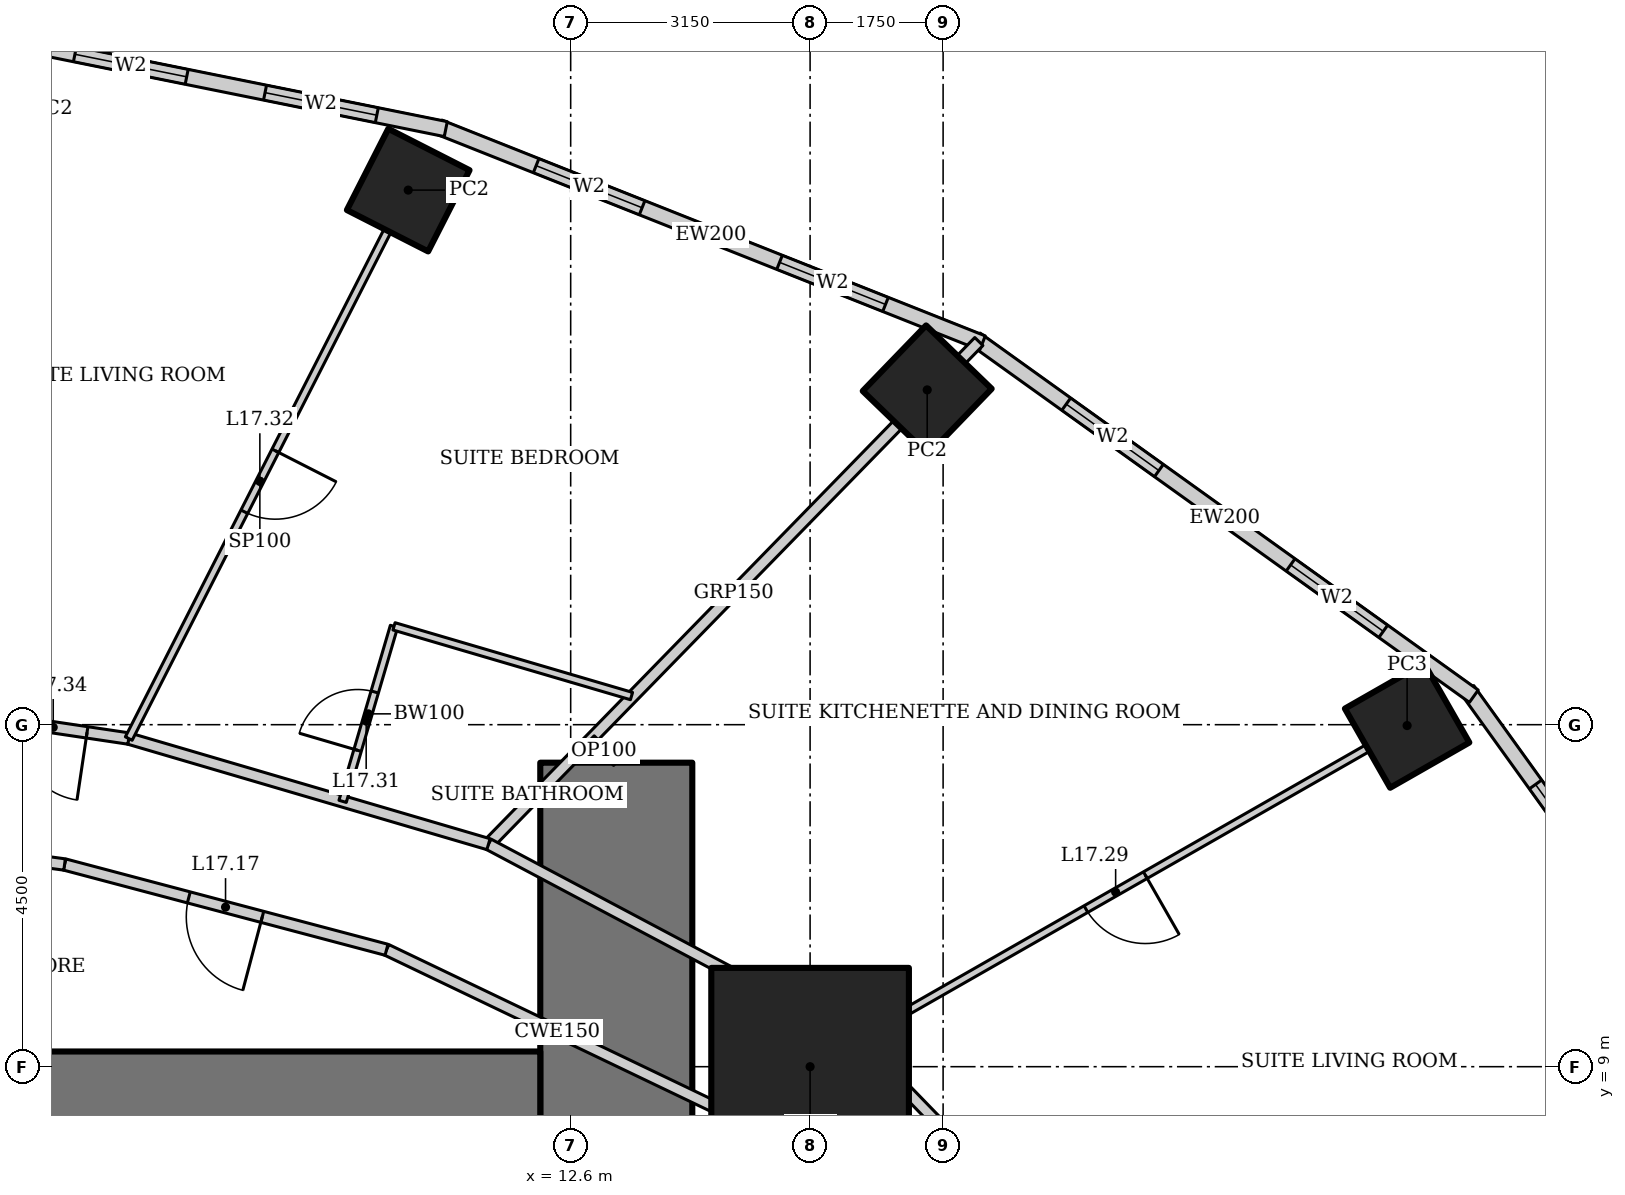
"""IFC4 building model, lengths in metres.
Left out: names, types, materials, properties, quantities, classifications, styles, units other than length and angle.
Written with IfcOpenShell. Run it as: python <this file> out.ifc"""

import sys

from ifc_helpers import new_model, si_unit, direction, frame, frame_2d, origin, origin_2d, place, context, subcontext, project, spatial, rectangle, hollow_rectangle, extrude, element, fill, save


model = new_model("IFC4")
c1 = context("Model", 3, precision=1e-05, world=origin(), true_north=direction((0.0, 1.0)))
c2 = subcontext(c1, "Body", "Model", "MODEL_VIEW")
j1 = project(units=[si_unit("LENGTHUNIT", "METRE"), si_unit("PLANEANGLEUNIT", "RADIAN")], contexts=[c1])
p1 = place(None, origin())
s1 = spatial("IfcSite", under=j1, at=p1, CompositionType="ELEMENT")
p2 = place(p1, origin())
s2 = spatial("IfcBuilding", under=s1, at=p2, CompositionType="ELEMENT")
p3 = place(p2, frame((0.0, 0.0, 76.6)))
s3 = spatial("IfcBuildingStorey", under=s2, at=p3, CompositionType="ELEMENT", Elevation=76.6)
p4 = place(p3, frame((15.75, 9.0, 0.0), z_axis=(0.0, 0.0, 1.0), x_axis=(1.0, 0.0, 0.0)))
e1 = element("IfcColumn", 1, at=p4, inside=s3, PredefinedType="COLUMN", context=c2, shape_type="SweptSolid", body=[
    extrude(hollow_rectangle(XDim=2.6, YDim=2.6, WallThickness=0.13, at=origin_2d()), origin(), (0.0, 0.0, 1.0), 3.6),
])
p5 = place(p3, frame((23.605, 13.489, 0.0), z_axis=(0.0, 0.0, 1.0), x_axis=(0.86824298017, 0.496139221777, 0.0)))
e2 = element("IfcColumn", 2, at=p5, inside=s3, PredefinedType="COLUMN", context=c2, shape_type="SweptSolid", body=[
    extrude(hollow_rectangle(XDim=1.2, YDim=1.2, WallThickness=0.12, at=origin_2d()), origin(), (0.0, 0.0, 1.0), 3.6),
])
for number, where, z_axis, x_axis in (
    (3, (17.291, 17.905, 0.0), (0.0, 0.0, 1.0), (0.695, 0.719, 0.0)),
    (4, (10.463, 20.534, 0.0), (0.0, 0.0, 1.0), (0.454, 0.891, 0.0)),
):
    element("IfcColumn", number, at=place(p3, frame(where, z_axis=z_axis, x_axis=x_axis)), inside=s3, PredefinedType="COLUMN", context=c2, shape_type="SweptSolid", body=[
        extrude(hollow_rectangle(XDim=1.2, YDim=1.2, WallThickness=0.1, at=origin_2d()), origin(), (0.0, 0.0, 1.0), 3.6),
    ])
p6 = place(p3, frame((13.2, -13.0, 0.0), z_axis=(0.0, 0.0, 1.0), x_axis=(0.0, 1.0, 0.0)))
e5 = element("IfcWall", 5, at=p6, inside=s3, PredefinedType="SHEAR", context=c2, shape_type="SweptSolid", body=[
    extrude(rectangle(XDim=26.0, YDim=2.0, at=frame_2d((13.0, 0.0))), origin(), (0.0, 0.0, 1.0), 3.6),
])
p7 = place(p6, frame((12.1, 0.0, 0.0)))
e6 = element("IfcOpeningElement", 6, at=p7, cuts=e5, PredefinedType="OPENING", context=c2, shape_type="SweptSolid", body=[
    extrude(rectangle(XDim=1.8, YDim=2.1, at=frame_2d((0.9, 1.05))), frame((0.0, 1.01, 0.0), z_axis=(0.0, -1.0, 0.0), x_axis=(1.0, 0.0, 0.0)), (0.0, 0.0, 1.0), 2.02),
])
p8 = place(p3, frame((12.2, 8.0, 0.0), z_axis=(0.0, 0.0, 1.0), x_axis=(-1.0, 0.0, 0.0)))
e7 = element("IfcWall", 7, at=p8, inside=s3, PredefinedType="SHEAR", context=c2, shape_type="SweptSolid", body=[
    extrude(rectangle(XDim=24.4, YDim=2.4, at=frame_2d((12.2, 0.0))), origin(), (0.0, 0.0, 1.0), 3.6),
])
p9 = place(p3, frame((29.26, 7.2, 0.0), z_axis=(0.0, 0.0, 1.0), x_axis=(-0.583937613703, 0.811798536155, 0.0)))
e8 = element("IfcWall", 8, at=p9, inside=s3, PredefinedType="SOLIDWALL", context=c2, shape_type="SweptSolid", body=[
    extrude(rectangle(XDim=8.323, YDim=0.2, at=frame_2d((4.162, 0.0))), origin(), (0.0, 0.0, 1.0), 3.45),
])
p10 = place(p9, frame((1.531, 0.0, 0.5)))
e9 = element("IfcOpeningElement", 9, at=p10, cuts=e8, PredefinedType="OPENING", context=c2, shape_type="SweptSolid", body=[
    extrude(rectangle(XDim=1.5, YDim=2.2, at=frame_2d((0.75, 1.1))), frame((0.0, 0.11, 0.0), z_axis=(0.0, -1.0, 0.0), x_axis=(1.0, 0.0, 0.0)), (0.0, 0.0, 1.0), 0.22),
])
p11 = place(p9, frame((5.292, 0.0, 0.5)))
e10 = element("IfcOpeningElement", 10, at=p11, cuts=e8, PredefinedType="OPENING", context=c2, shape_type="SweptSolid", body=[
    extrude(rectangle(XDim=1.5, YDim=2.2, at=frame_2d((0.75, 1.1))), frame((0.0, 0.11, 0.0), z_axis=(0.0, -1.0, 0.0), x_axis=(1.0, 0.0, 0.0)), (0.0, 0.0, 1.0), 0.22),
])
p12 = place(p3, frame((24.482, 13.875, 0.0), z_axis=(0.0, 0.0, 1.0), x_axis=(-0.812791321576, 0.582554948112, 0.0)))
e11 = element("IfcWall", 11, at=p12, inside=s3, PredefinedType="SOLIDWALL", context=c2, shape_type="SweptSolid", body=[
    extrude(rectangle(XDim=8.063, YDim=0.2, at=frame_2d((4.032, 0.0))), origin(), (0.0, 0.0, 1.0), 3.45),
])
p13 = place(p12, frame((1.466, 0.0, 0.5)))
e12 = element("IfcOpeningElement", 12, at=p13, cuts=e11, PredefinedType="OPENING", context=c2, shape_type="SweptSolid", body=[
    extrude(rectangle(XDim=1.5, YDim=2.2, at=frame_2d((0.75, 1.1))), frame((0.0, 0.11, 0.0), z_axis=(0.0, -1.0, 0.0), x_axis=(1.0, 0.0, 0.0)), (0.0, 0.0, 1.0), 0.22),
])
p14 = place(p12, frame((5.097, 0.0, 0.5)))
e13 = element("IfcOpeningElement", 13, at=p14, cuts=e11, PredefinedType="OPENING", context=c2, shape_type="SweptSolid", body=[
    extrude(rectangle(XDim=1.5, YDim=2.2, at=frame_2d((0.75, 1.1))), frame((0.0, 0.11, 0.0), z_axis=(0.0, -1.0, 0.0), x_axis=(1.0, 0.0, 0.0)), (0.0, 0.0, 1.0), 0.22),
])
p15 = place(p3, frame((18.018, 18.523, 0.0), z_axis=(0.0, 0.0, 1.0), x_axis=(-0.929358351251, 0.369178892895, 0.0)))
e14 = element("IfcWall", 14, at=p15, inside=s3, PredefinedType="SOLIDWALL", context=c2, shape_type="SweptSolid", body=[
    extrude(rectangle(XDim=7.692, YDim=0.2, at=frame_2d((3.846, 0.0))), origin(), (0.0, 0.0, 1.0), 3.45),
])
p16 = place(p15, frame((1.373, 0.0, 0.5)))
e15 = element("IfcOpeningElement", 15, at=p16, cuts=e14, PredefinedType="OPENING", context=c2, shape_type="SweptSolid", body=[
    extrude(rectangle(XDim=1.5, YDim=2.2, at=frame_2d((0.75, 1.1))), frame((0.0, 0.11, 0.0), z_axis=(0.0, -1.0, 0.0), x_axis=(1.0, 0.0, 0.0)), (0.0, 0.0, 1.0), 0.22),
])
p17 = place(p15, frame((4.819, 0.0, 0.5)))
e16 = element("IfcOpeningElement", 16, at=p17, cuts=e14, PredefinedType="OPENING", context=c2, shape_type="SweptSolid", body=[
    extrude(rectangle(XDim=1.5, YDim=2.2, at=frame_2d((0.75, 1.1))), frame((0.0, 0.11, 0.0), z_axis=(0.0, -1.0, 0.0), x_axis=(1.0, 0.0, 0.0)), (0.0, 0.0, 1.0), 0.22),
])
p18 = place(p3, frame((10.957, 21.337, 0.0), z_axis=(0.0, 0.0, 1.0), x_axis=(-0.980251657452, 0.197754110105, 0.0)))
e17 = element("IfcWall", 17, at=p18, inside=s3, PredefinedType="SOLIDWALL", context=c2, shape_type="SweptSolid", body=[
    extrude(rectangle(XDim=5.904, YDim=0.2, at=frame_2d((2.952, 0.0))), origin(), (0.0, 0.0, 1.0), 3.45),
])
p19 = place(p18, frame((0.926, 0.0, 0.5)))
e18 = element("IfcOpeningElement", 18, at=p19, cuts=e17, PredefinedType="OPENING", context=c2, shape_type="SweptSolid", body=[
    extrude(rectangle(XDim=1.5, YDim=2.2, at=frame_2d((0.75, 1.1))), frame((0.0, 0.11, 0.0), z_axis=(0.0, -1.0, 0.0), x_axis=(1.0, 0.0, 0.0)), (0.0, 0.0, 1.0), 0.22),
])
p20 = place(p18, frame((3.478, 0.0, 0.5)))
e19 = element("IfcOpeningElement", 19, at=p20, cuts=e17, PredefinedType="OPENING", context=c2, shape_type="SweptSolid", body=[
    extrude(rectangle(XDim=1.5, YDim=2.2, at=frame_2d((0.75, 1.1))), frame((0.0, 0.11, 0.0), z_axis=(0.0, -1.0, 0.0), x_axis=(1.0, 0.0, 0.0)), (0.0, 0.0, 1.0), 0.22),
])
p21 = place(p3, frame((17.97, 18.542, 0.0), z_axis=(0.0, 0.0, 1.0), x_axis=(-0.698279935955, -0.715824790743, 0.0)))
e20 = element("IfcWall", 20, at=p21, inside=s3, PredefinedType="PARTITIONING", context=c2, shape_type="SweptSolid", body=[
    extrude(rectangle(XDim=9.24, YDim=0.15, at=frame_2d((4.62, 0.0))), origin(), (0.0, 0.0, 1.0), 2.528),
])
p22 = place(p3, frame((20.484, 5.107, 0.0), z_axis=(0.0, 0.0, 1.0), x_axis=(-0.695871090686, 0.71816671125, 0.0)))
e21 = element("IfcWall", 21, at=p22, inside=s3, PredefinedType="PARTITIONING", context=c2, shape_type="SweptSolid", body=[
    extrude(rectangle(XDim=5.913, YDim=0.15, at=frame_2d((2.957, 0.0))), origin(), (0.0, 0.0, 1.0), 3.45),
])
p23 = place(p22, frame((0.15, 0.0, 0.0)))
e22 = element("IfcOpeningElement", 22, at=p23, cuts=e21, PredefinedType="OPENING", context=c2, shape_type="SweptSolid", body=[
    extrude(rectangle(XDim=0.9, YDim=2.1, at=frame_2d((0.45, 1.05))), frame((0.0, 0.085, 0.0), z_axis=(0.0, -1.0, 0.0), x_axis=(1.0, 0.0, 0.0)), (0.0, 0.0, 1.0), 0.17),
])
p24 = place(p3, frame((16.369, 9.354, 0.0), z_axis=(0.0, 0.0, 1.0), x_axis=(-0.883334368785, 0.468743419071, 0.0)))
e23 = element("IfcWall", 23, at=p24, inside=s3, PredefinedType="PARTITIONING", context=c2, shape_type="SweptSolid", body=[
    extrude(rectangle(XDim=5.491, YDim=0.15, at=frame_2d((2.746, 0.0))), origin(), (0.0, 0.0, 1.0), 3.45),
])
p25 = place(p3, frame((11.519, 11.928, 0.0), z_axis=(0.0, 0.0, 1.0), x_axis=(-0.959496227294, 0.281721475589, 0.0)))
e24 = element("IfcWall", 24, at=p25, inside=s3, PredefinedType="PARTITIONING", context=c2, shape_type="SweptSolid", body=[
    extrude(rectangle(XDim=4.933, YDim=0.15, at=frame_2d((2.466, 0.0))), origin(), (0.0, 0.0, 1.0), 3.45),
])
p26 = place(p3, frame((6.786, 13.317, 0.0), z_axis=(0.0, 0.0, 1.0), x_axis=(-0.989107488999, 0.14719502439, 0.0)))
e25 = element("IfcWall", 25, at=p26, inside=s3, PredefinedType="PARTITIONING", context=c2, shape_type="SweptSolid", body=[
    extrude(rectangle(XDim=3.627, YDim=0.15, at=frame_2d((1.814, 0.0))), origin(), (0.0, 0.0, 1.0), 3.45),
])
p27 = place(p26, frame((0.554, 0.0, 0.0)))
e26 = element("IfcOpeningElement", 26, at=p27, cuts=e25, PredefinedType="OPENING", context=c2, shape_type="SweptSolid", body=[
    extrude(rectangle(XDim=0.9, YDim=2.1, at=frame_2d((0.45, 1.05))), frame((0.0, 0.085, 0.0), z_axis=(0.0, -1.0, 0.0), x_axis=(1.0, 0.0, 0.0)), (0.0, 0.0, 1.0), 0.17),
])
p28 = place(p3, frame((18.672, 4.655, 0.0), z_axis=(0.0, 0.0, 1.0), x_axis=(-0.731260145007, 0.682098673452, 0.0)))
e27 = element("IfcWall", 27, at=p28, inside=s3, PredefinedType="PARTITIONING", context=c2, shape_type="SweptSolid", body=[
    extrude(rectangle(XDim=5.468, YDim=0.15, at=frame_2d((2.734, 0.0))), origin(), (0.0, 0.0, 1.0), 3.45),
])
p29 = place(p28, frame((2.234, 0.0, 0.0)))
e28 = element("IfcOpeningElement", 28, at=p29, cuts=e27, PredefinedType="OPENING", context=c2, shape_type="SweptSolid", body=[
    extrude(rectangle(XDim=1.0, YDim=2.1, at=frame_2d((0.5, 1.05))), frame((0.0, 0.085, 0.0), z_axis=(0.0, -1.0, 0.0), x_axis=(1.0, 0.0, 0.0)), (0.0, 0.0, 1.0), 0.17),
])
p30 = place(p3, frame((14.673, 8.385, 0.0), z_axis=(0.0, 0.0, 1.0), x_axis=(-0.901869692799, 0.43200816799, 0.0)))
e29 = element("IfcWall", 29, at=p30, inside=s3, PredefinedType="PARTITIONING", context=c2, shape_type="SweptSolid", body=[
    extrude(rectangle(XDim=4.986, YDim=0.15, at=frame_2d((2.493, 0.0))), origin(), (0.0, 0.0, 1.0), 3.45),
])
p31 = place(p3, frame((10.177, 10.539, 0.0), z_axis=(0.0, 0.0, 1.0), x_axis=(-0.966672790407, 0.256015070428, 0.0)))
e30 = element("IfcWall", 30, at=p31, inside=s3, PredefinedType="PARTITIONING", context=c2, shape_type="SweptSolid", body=[
    extrude(rectangle(XDim=4.382, YDim=0.15, at=frame_2d((2.191, 0.0))), origin(), (0.0, 0.0, 1.0), 3.45),
])
p32 = place(p31, frame((1.691, 0.0, 0.0)))
e31 = element("IfcOpeningElement", 31, at=p32, cuts=e30, PredefinedType="OPENING", context=c2, shape_type="SweptSolid", body=[
    extrude(rectangle(XDim=1.0, YDim=2.1, at=frame_2d((0.5, 1.05))), frame((0.0, 0.085, 0.0), z_axis=(0.0, -1.0, 0.0), x_axis=(1.0, 0.0, 0.0)), (0.0, 0.0, 1.0), 0.17),
])
p33 = place(p3, frame((5.941, 11.66, 0.0), z_axis=(0.0, 0.0, 1.0), x_axis=(-0.991129053928, 0.13290296633, 0.0)))
e32 = element("IfcWall", 32, at=p33, inside=s3, PredefinedType="PARTITIONING", context=c2, shape_type="SweptSolid", body=[
    extrude(rectangle(XDim=3.18, YDim=0.15, at=frame_2d((1.59, 0.0))), origin(), (0.0, 0.0, 1.0), 3.45),
])
p34 = place(p3, frame((23.171, 13.24, 0.0), z_axis=(0.0, 0.0, 1.0), x_axis=(-0.868243142124, -0.496138938357, 0.0)))
e33 = element("IfcWall", 33, at=p34, inside=s3, PredefinedType="PARTITIONING", context=c2, shape_type="SweptSolid", body=[
    extrude(rectangle(XDim=7.834, YDim=0.1, at=frame_2d((3.917, 0.0))), origin(), (0.0, 0.0, 1.0), 2.693),
])
p35 = place(p34, frame((3.467, 0.0, 0.0)))
e34 = element("IfcOpeningElement", 34, at=p35, cuts=e33, PredefinedType="OPENING", context=c2, shape_type="SweptSolid", body=[
    extrude(rectangle(XDim=0.9, YDim=2.1, at=frame_2d((0.45, 1.05))), frame((0.0, 0.06, 0.0), z_axis=(0.0, -1.0, 0.0), x_axis=(1.0, 0.0, 0.0)), (0.0, 0.0, 1.0), 0.12),
])
p36 = place(p3, frame((9.6, 12.491, 0.0), z_axis=(0.0, 0.0, 1.0), x_axis=(0.281687126576, 0.959506311976, 0.0)))
e35 = element("IfcWall", 35, at=p36, inside=s3, PredefinedType="PARTITIONING", context=c2, shape_type="SweptSolid", body=[
    extrude(rectangle(XDim=2.4, YDim=0.1, at=frame_2d((1.2, 0.0))), origin(), (0.0, 0.0, 1.0), 3.45),
])
p37 = place(p36, frame((0.7, 0.0, 0.0)))
e36 = element("IfcOpeningElement", 36, at=p37, cuts=e35, PredefinedType="OPENING", context=c2, shape_type="SweptSolid", body=[
    extrude(rectangle(XDim=0.8, YDim=2.1, at=frame_2d((0.4, 1.05))), frame((0.0, 0.06, 0.0), z_axis=(0.0, -1.0, 0.0), x_axis=(1.0, 0.0, 0.0)), (0.0, 0.0, 1.0), 0.12),
])
p38 = place(p3, frame((10.276, 14.794, 0.0), z_axis=(0.0, 0.0, 1.0), x_axis=(0.959495516486, -0.281723896473, 0.0)))
e37 = element("IfcWall", 37, at=p38, inside=s3, PredefinedType="PARTITIONING", context=c2, shape_type="SweptSolid", body=[
    extrude(rectangle(XDim=3.257, YDim=0.1, at=frame_2d((1.628, 0.0))), origin(), (0.0, 0.0, 1.0), 3.45),
])
p39 = place(p3, frame((10.236, 20.088, 0.0), z_axis=(0.0, 0.0, 1.0), x_axis=(-0.453985938962, -0.891008848006, 0.0)))
e38 = element("IfcWall", 38, at=p39, inside=s3, PredefinedType="PARTITIONING", context=c2, shape_type="SweptSolid", body=[
    extrude(rectangle(XDim=7.599, YDim=0.1, at=frame_2d((3.8, 0.0))), origin(), (0.0, 0.0, 1.0), 2.528),
])
p40 = place(p39, frame((3.35, 0.0, 0.0)))
e39 = element("IfcOpeningElement", 39, at=p40, cuts=e38, PredefinedType="OPENING", context=c2, shape_type="SweptSolid", body=[
    extrude(rectangle(XDim=0.9, YDim=2.1, at=frame_2d((0.45, 1.05))), frame((0.0, 0.06, 0.0), z_axis=(0.0, -1.0, 0.0), x_axis=(1.0, 0.0, 0.0)), (0.0, 0.0, 1.0), 0.12),
])
p41 = place(p3, frame((13.2, 13.0, 0.0), z_axis=(0.0, 0.0, 1.0), x_axis=(-0.715906247499, 0.698196422786, 0.0)))
e40 = element("IfcWall", 40, at=p41, inside=s3, PredefinedType="PARTITIONING", context=c2, shape_type="SweptSolid", body=[
    extrude(rectangle(XDim=0.455, YDim=0.1, at=frame_2d((0.228, 0.0))), origin(), (0.0, 0.0, 1.0), 3.45),
])
p42 = place(p11, origin())
e41 = element("IfcWindow", 41, at=p42, inside=s3, PartitioningType="SINGLE_PANEL", PredefinedType="WINDOW", context=c2, shape_type="SweptSolid", body=[
    extrude(rectangle(XDim=1.5, YDim=2.2, at=frame_2d((0.75, 1.1))), frame((0.0, 0.03, 0.0), z_axis=(0.0, -1.0, 0.0), x_axis=(1.0, 0.0, 0.0)), (0.0, 0.0, 1.0), 0.06),
])
fill(e10, e41)
p43 = place(p13, origin())
e42 = element("IfcWindow", 42, at=p43, inside=s3, PartitioningType="SINGLE_PANEL", PredefinedType="WINDOW", context=c2, shape_type="SweptSolid", body=[
    extrude(rectangle(XDim=1.5, YDim=2.2, at=frame_2d((0.75, 1.1))), frame((0.0, 0.03, 0.0), z_axis=(0.0, -1.0, 0.0), x_axis=(1.0, 0.0, 0.0)), (0.0, 0.0, 1.0), 0.06),
])
fill(e12, e42)
p44 = place(p14, origin())
e43 = element("IfcWindow", 43, at=p44, inside=s3, PartitioningType="SINGLE_PANEL", PredefinedType="WINDOW", context=c2, shape_type="SweptSolid", body=[
    extrude(rectangle(XDim=1.5, YDim=2.2, at=frame_2d((0.75, 1.1))), frame((0.0, 0.03, 0.0), z_axis=(0.0, -1.0, 0.0), x_axis=(1.0, 0.0, 0.0)), (0.0, 0.0, 1.0), 0.06),
])
fill(e13, e43)
p45 = place(p16, origin())
e44 = element("IfcWindow", 44, at=p45, inside=s3, PartitioningType="SINGLE_PANEL", PredefinedType="WINDOW", context=c2, shape_type="SweptSolid", body=[
    extrude(rectangle(XDim=1.5, YDim=2.2, at=frame_2d((0.75, 1.1))), frame((0.0, 0.03, 0.0), z_axis=(0.0, -1.0, 0.0), x_axis=(1.0, 0.0, 0.0)), (0.0, 0.0, 1.0), 0.06),
])
fill(e15, e44)
p46 = place(p17, origin())
e45 = element("IfcWindow", 45, at=p46, inside=s3, PartitioningType="SINGLE_PANEL", PredefinedType="WINDOW", context=c2, shape_type="SweptSolid", body=[
    extrude(rectangle(XDim=1.5, YDim=2.2, at=frame_2d((0.75, 1.1))), frame((0.0, 0.03, 0.0), z_axis=(0.0, -1.0, 0.0), x_axis=(1.0, 0.0, 0.0)), (0.0, 0.0, 1.0), 0.06),
])
fill(e16, e45)
p47 = place(p19, origin())
e46 = element("IfcWindow", 46, at=p47, inside=s3, PartitioningType="SINGLE_PANEL", PredefinedType="WINDOW", context=c2, shape_type="SweptSolid", body=[
    extrude(rectangle(XDim=1.5, YDim=2.2, at=frame_2d((0.75, 1.1))), frame((0.0, 0.03, 0.0), z_axis=(0.0, -1.0, 0.0), x_axis=(1.0, 0.0, 0.0)), (0.0, 0.0, 1.0), 0.06),
])
fill(e18, e46)
p48 = place(p20, origin())
e47 = element("IfcWindow", 47, at=p48, inside=s3, PartitioningType="SINGLE_PANEL", PredefinedType="WINDOW", context=c2, shape_type="SweptSolid", body=[
    extrude(rectangle(XDim=1.5, YDim=2.2, at=frame_2d((0.75, 1.1))), frame((0.0, 0.03, 0.0), z_axis=(0.0, -1.0, 0.0), x_axis=(1.0, 0.0, 0.0)), (0.0, 0.0, 1.0), 0.06),
])
fill(e19, e47)
p49 = place(p32, origin())
e48 = element("IfcDoor", 48, at=p49, inside=s3, OperationType="SINGLE_SWING_LEFT", PredefinedType="DOOR", context=c2, shape_type="SweptSolid", body=[
    extrude(rectangle(XDim=1.0, YDim=2.1, at=frame_2d((0.5, 1.05))), frame((0.0, 0.025, 0.0), z_axis=(0.0, -1.0, 0.0), x_axis=(1.0, 0.0, 0.0)), (0.0, 0.0, 1.0), 0.05),
])
fill(e31, e48)
p50 = place(p35, origin())
e49 = element("IfcDoor", 49, at=p50, inside=s3, OperationType="SINGLE_SWING_LEFT", PredefinedType="DOOR", context=c2, shape_type="SweptSolid", body=[
    extrude(rectangle(XDim=0.9, YDim=2.1, at=frame_2d((0.45, 1.05))), frame((0.0, 0.025, 0.0), z_axis=(0.0, -1.0, 0.0), x_axis=(1.0, 0.0, 0.0)), (0.0, 0.0, 1.0), 0.05),
])
fill(e34, e49)
p51 = place(p37, origin())
e50 = element("IfcDoor", 50, at=p51, inside=s3, OperationType="SINGLE_SWING_LEFT", PredefinedType="DOOR", context=c2, shape_type="SweptSolid", body=[
    extrude(rectangle(XDim=0.8, YDim=2.1, at=frame_2d((0.4, 1.05))), frame((0.0, 0.025, 0.0), z_axis=(0.0, -1.0, 0.0), x_axis=(1.0, 0.0, 0.0)), (0.0, 0.0, 1.0), 0.05),
])
fill(e36, e50)
p52 = place(p40, origin())
e51 = element("IfcDoor", 51, at=p52, inside=s3, OperationType="SINGLE_SWING_LEFT", PredefinedType="DOOR", context=c2, shape_type="SweptSolid", body=[
    extrude(rectangle(XDim=0.9, YDim=2.1, at=frame_2d((0.45, 1.05))), frame((0.0, 0.025, 0.0), z_axis=(0.0, -1.0, 0.0), x_axis=(1.0, 0.0, 0.0)), (0.0, 0.0, 1.0), 0.05),
])
fill(e39, e51)
p53 = place(p27, origin())
e52 = element("IfcDoor", 52, at=p53, inside=s3, OperationType="SINGLE_SWING_LEFT", PredefinedType="DOOR", context=c2, shape_type="SweptSolid", body=[
    extrude(rectangle(XDim=0.9, YDim=2.1, at=frame_2d((0.45, 1.05))), frame((0.0, 0.025, 0.0), z_axis=(0.0, -1.0, 0.0), x_axis=(1.0, 0.0, 0.0)), (0.0, 0.0, 1.0), 0.05),
])
fill(e26, e52)
save(model, sys.argv[1])
